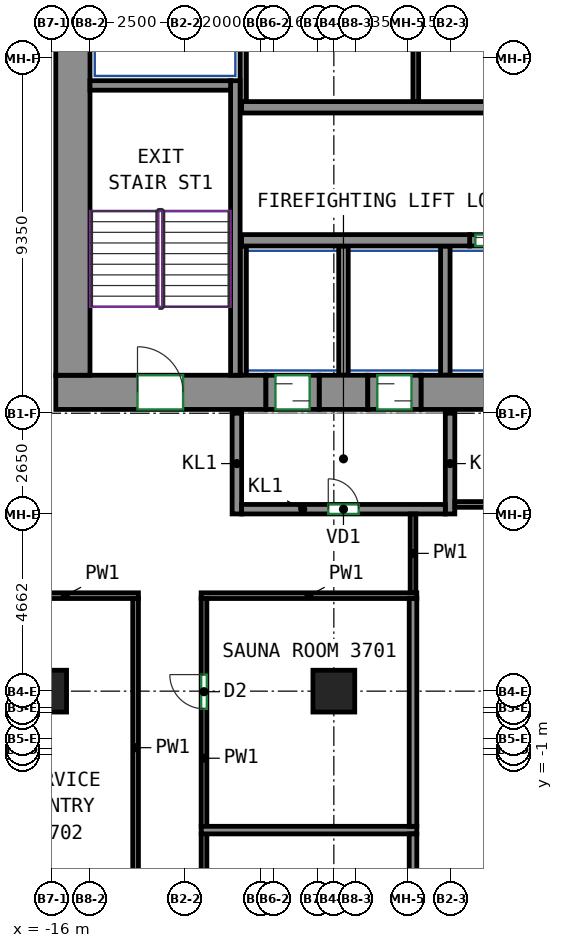
"""IFC4 building model, lengths in metres.
Left out: names, types, materials, properties, quantities, classifications, styles, units other than length and angle.
Written with IfcOpenShell. Run it as: python <this file> out.ifc"""

import sys

from ifc_helpers import new_model, si_unit, direction, frame, frame_2d, origin, origin_2d, place, context, subcontext, project, spatial, rectangle, extrude, source, transform, mapped, element, fill, save


model = new_model("IFC4")
c1 = context("Model", 3, precision=1e-05, world=origin(), true_north=direction((0.0, 1.0)))
c2 = subcontext(c1, "Body", "Model", "MODEL_VIEW")
j1 = project(units=[si_unit("LENGTHUNIT", "METRE"), si_unit("PLANEANGLEUNIT", "RADIAN")], contexts=[c1])
p1 = place(None, origin())
s1 = spatial("IfcSite", under=j1, at=p1, CompositionType="ELEMENT")
p2 = place(p1, origin())
s2 = spatial("IfcBuilding", under=s1, at=p2, CompositionType="ELEMENT")
p3 = place(p2, frame((0.0, 0.0, 160.9)))
s3 = spatial("IfcBuildingStorey", under=s2, at=p3, CompositionType="ELEMENT", Elevation=160.9)
m1 = source(origin(), c2, "Body", "SweptSolid", [
    extrude(rectangle(XDim=1.1, YDim=1.1, at=origin_2d()), origin(), (0.0, 0.0, 1.0), 3.0),
])
for number, where, z_axis, x_axis in (
    (1, (-16.167, 0.688, 0.0), (0.0, 0.0, 1.0), (1.0, 0.0, 0.0)),
    (2, (-8.583, 0.688, 0.0), (0.0, 0.0, 1.0), (1.0, 0.0, 0.0)),
):
    element("IfcColumn", number, at=place(p3, frame(where, z_axis=z_axis, x_axis=x_axis)), inside=s3, PredefinedType="COLUMN", context=c2, shape_type="MappedRepresentation", body=[
        mapped(m1, transform((0.0, 0.0, 0.0))),
    ])
m2 = source(origin(), c2, "Body", "SweptSolid", [
    extrude(rectangle(XDim=5.53, YDim=0.9, at=frame_2d((2.765, 0.0))), origin(), (0.0, 0.0, 1.0), 3.0),
])
p4 = place(p3, frame((-15.9, 8.55, 0.0), z_axis=(0.0, 0.0, 1.0), x_axis=(1.0, 0.0, 0.0)))
e3 = element("IfcWall", 3, at=p4, inside=s3, PredefinedType="SHEAR", context=c2, shape_type="MappedRepresentation", body=[
    mapped(m2, transform((0.0, 0.0, 0.0))),
])
p5 = place(p4, frame((2.15, 0.0, 0.0)))
e4 = element("IfcOpeningElement", 4, at=p5, cuts=e3, PredefinedType="OPENING", context=c2, shape_type="SweptSolid", body=[
    extrude(rectangle(XDim=1.2, YDim=2.1, at=frame_2d((0.6, 1.05))), frame((0.0, 0.46, 0.0), z_axis=(0.0, -1.0, 0.0), x_axis=(1.0, 0.0, 0.0)), (0.0, 0.0, 1.0), 0.92),
])
m3 = source(origin(), c2, "Body", "SweptSolid", [
    extrude(rectangle(XDim=1.28, YDim=0.9, at=frame_2d((0.64, 0.0))), origin(), (0.0, 0.0, 1.0), 3.0),
])
p6 = place(p3, frame((-8.97, 8.55, 0.0), z_axis=(0.0, 0.0, 1.0), x_axis=(1.0, 0.0, 0.0)))
e5 = element("IfcWall", 5, at=p6, inside=s3, PredefinedType="SHEAR", context=c2, shape_type="MappedRepresentation", body=[
    mapped(m3, transform((0.0, 0.0, 0.0))),
])
m4 = source(origin(), c2, "Body", "SweptSolid", [
    extrude(rectangle(XDim=14.18, YDim=0.9, at=frame_2d((7.09, 0.0))), origin(), (0.0, 0.0, 1.0), 3.0),
])
p7 = place(p3, frame((-6.29, 8.55, 0.0), z_axis=(0.0, 0.0, 1.0), x_axis=(1.0, 0.0, 0.0)))
e6 = element("IfcWall", 6, at=p7, inside=s3, PredefinedType="SHEAR", context=c2, shape_type="MappedRepresentation", body=[
    mapped(m4, transform((0.0, 0.0, 0.0))),
])
m5 = source(origin(), c2, "Body", "SweptSolid", [
    extrude(rectangle(XDim=12.0, YDim=0.9, at=frame_2d((6.0, 0.0))), origin(), (0.0, 0.0, 1.0), 3.0),
])
p8 = place(p3, frame((-15.45, 9.0, 0.0), z_axis=(0.0, 0.0, 1.0), x_axis=(0.0, 1.0, 0.0)))
e7 = element("IfcWall", 7, at=p8, inside=s3, PredefinedType="SHEAR", context=c2, shape_type="MappedRepresentation", body=[
    mapped(m5, transform((0.0, 0.0, 0.0))),
])
m6 = source(origin(), c2, "Body", "SweptSolid", [
    extrude(rectangle(XDim=7.75, YDim=0.25, at=frame_2d((3.875, 0.0))), origin(), (0.0, 0.0, 1.0), 3.0),
])
p9 = place(p3, frame((-11.175, 9.0, 0.0), z_axis=(0.0, 0.0, 1.0), x_axis=(0.0, 1.0, 0.0)))
e8 = element("IfcWall", 8, at=p9, inside=s3, PredefinedType="SHEAR", context=c2, shape_type="MappedRepresentation", body=[
    mapped(m6, transform((0.0, 0.0, 0.0))),
])
m7 = source(origin(), c2, "Body", "SweptSolid", [
    extrude(rectangle(XDim=3.7, YDim=0.25, at=frame_2d((1.85, 0.0))), origin(), (0.0, 0.0, 1.0), 3.0),
])
p10 = place(p3, frame((-15.0, 16.625, 0.0), z_axis=(0.0, 0.0, 1.0), x_axis=(1.0, 0.0, 0.0)))
e9 = element("IfcWall", 9, at=p10, inside=s3, PredefinedType="SHEAR", context=c2, shape_type="MappedRepresentation", body=[
    mapped(m7, transform((0.0, 0.0, 0.0))),
])
m8 = source(origin(), c2, "Body", "SweptSolid", [
    extrude(rectangle(XDim=6.0, YDim=0.3, at=frame_2d((3.0, 0.0))), origin(), (0.0, 0.0, 1.0), 3.0),
])
p11 = place(p3, frame((-11.01, 12.55, 0.0), z_axis=(0.0, 0.0, 1.0), x_axis=(1.0, 0.0, 0.0)))
e10 = element("IfcWall", 10, at=p11, inside=s3, PredefinedType="SHEAR", context=c2, shape_type="MappedRepresentation", body=[
    mapped(m8, transform((0.0, 0.0, 0.0))),
])
m9 = source(origin(), c2, "Body", "SweptSolid", [
    extrude(rectangle(XDim=14.04, YDim=0.3, at=frame_2d((7.02, 0.0))), origin(), (0.0, 0.0, 1.0), 3.0),
])
p12 = place(p3, frame((-11.01, 16.05, 0.0), z_axis=(0.0, 0.0, 1.0), x_axis=(1.0, 0.0, 0.0)))
e11 = element("IfcWall", 11, at=p12, inside=s3, PredefinedType="SHEAR", context=c2, shape_type="MappedRepresentation", body=[
    mapped(m9, transform((0.0, 0.0, 0.0))),
])
m10 = source(origin(), c2, "Body", "SweptSolid", [
    extrude(rectangle(XDim=1.4, YDim=0.3, at=frame_2d((0.7, 0.0))), origin(), (0.0, 0.0, 1.0), 3.0),
])
p13 = place(p3, frame((-5.01, 12.55, 0.0), z_axis=(0.0, 0.0, 1.0), x_axis=(1.0, 0.0, 0.0)))
e12 = element("IfcWall", 12, at=p13, inside=s3, PredefinedType="PARTITIONING", context=c2, shape_type="MappedRepresentation", body=[
    mapped(m10, transform((0.0, 0.0, 0.0))),
])
p14 = place(p13, frame((0.15, 0.0, 0.0)))
e13 = element("IfcOpeningElement", 13, at=p14, cuts=e12, PredefinedType="OPENING", context=c2, shape_type="SweptSolid", body=[
    extrude(rectangle(XDim=1.1, YDim=2.1, at=frame_2d((0.55, 1.05))), frame((0.0, 0.16, 0.0), z_axis=(0.0, -1.0, 0.0), x_axis=(1.0, 0.0, 0.0)), (0.0, 0.0, 1.0), 0.32),
])
m11 = source(origin(), c2, "Body", "SweptSolid", [
    extrude(rectangle(XDim=2.65, YDim=0.25, at=frame_2d((1.325, 0.0))), origin(), (0.0, 0.0, 1.0), 3.0),
])
for number, where, z_axis, x_axis in (
    (14, (-11.135, 5.35, 0.0), (0.0, 0.0, 1.0), (0.0, 1.0, 0.0)),
    (15, (-5.525, 5.35, 0.0), (0.0, 0.0, 1.0), (0.0, 1.0, 0.0)),
):
    element("IfcWall", number, at=place(p3, frame(where, z_axis=z_axis, x_axis=x_axis)), inside=s3, PredefinedType="PARTITIONING", context=c2, shape_type="MappedRepresentation", body=[
        mapped(m11, transform((0.0, 0.0, 0.0))),
    ])
m12 = source(origin(), c2, "Body", "SweptSolid", [
    extrude(rectangle(XDim=5.36, YDim=0.25, at=frame_2d((2.68, 0.0))), origin(), (0.0, 0.0, 1.0), 3.0),
])
p15 = place(p3, frame((-11.01, 5.475, 0.0), z_axis=(0.0, 0.0, 1.0), x_axis=(1.0, 0.0, 0.0)))
e16 = element("IfcWall", 16, at=p15, inside=s3, PredefinedType="PARTITIONING", context=c2, shape_type="MappedRepresentation", body=[
    mapped(m12, transform((0.0, 0.0, 0.0))),
])
p16 = place(p15, frame((2.28, 0.0, 0.0)))
e17 = element("IfcOpeningElement", 17, at=p16, cuts=e16, PredefinedType="OPENING", context=c2, shape_type="SweptSolid", body=[
    extrude(rectangle(XDim=0.8, YDim=2.0, at=frame_2d((0.4, 1.0))), frame((0.0, 0.135, 0.0), z_axis=(0.0, -1.0, 0.0), x_axis=(1.0, 0.0, 0.0)), (0.0, 0.0, 1.0), 0.27),
])
m13 = source(origin(), c2, "Body", "SweptSolid", [
    extrude(rectangle(XDim=4.8, YDim=0.165, at=frame_2d((2.4, 0.0))), origin(), (0.0, 0.0, 1.0), 3.0),
])
p17 = place(p3, frame((-10.968, 16.2, 0.0), z_axis=(0.0, 0.0, 1.0), x_axis=(0.0, 1.0, 0.0)))
e18 = element("IfcWall", 18, at=p17, inside=s3, PredefinedType="PARTITIONING", context=c2, shape_type="MappedRepresentation", body=[
    mapped(m13, transform((0.0, 0.0, 0.0))),
])
m14 = source(origin(), c2, "Body", "SweptSolid", [
    extrude(rectangle(XDim=3.4, YDim=0.165, at=frame_2d((1.7, 0.0))), origin(), (0.0, 0.0, 1.0), 3.0),
])
p18 = place(p3, frame((-10.968, 9.0, 0.0), z_axis=(0.0, 0.0, 1.0), x_axis=(0.0, 1.0, 0.0)))
e19 = element("IfcWall", 19, at=p18, inside=s3, PredefinedType="PARTITIONING", context=c2, shape_type="MappedRepresentation", body=[
    mapped(m14, transform((0.0, 0.0, 0.0))),
])
m15 = source(origin(), c2, "Body", "SweptSolid", [
    extrude(rectangle(XDim=3.4, YDim=0.25, at=frame_2d((1.7, 0.0))), origin(), (0.0, 0.0, 1.0), 3.0),
])
for number, where, z_axis, x_axis in (
    (20, (-5.65, 9.0, 0.0), (0.0, 0.0, 1.0), (0.0, 1.0, 0.0)),
    (21, (-8.33, 9.0, 0.0), (0.0, 0.0, 1.0), (0.0, 1.0, 0.0)),
):
    element("IfcWall", number, at=place(p3, frame(where, z_axis=z_axis, x_axis=x_axis)), inside=s3, PredefinedType="PARTITIONING", context=c2, shape_type="MappedRepresentation", body=[
        mapped(m15, transform((0.0, 0.0, 0.0))),
    ])
m16 = source(origin(), c2, "Body", "SweptSolid", [
    extrude(rectangle(XDim=4.8, YDim=0.15, at=frame_2d((2.4, 0.0))), origin(), (0.0, 0.0, 1.0), 3.0),
])
p19 = place(p3, frame((-6.427, 16.2, 0.0), z_axis=(0.0, 0.0, 1.0), x_axis=(0.0, 1.0, 0.0)))
e22 = element("IfcWall", 22, at=p19, inside=s3, PredefinedType="PARTITIONING", context=c2, shape_type="MappedRepresentation", body=[
    mapped(m16, transform((0.0, 0.0, 0.0))),
])
m17 = source(origin(), c2, "Body", "SweptSolid", [
    extrude(rectangle(XDim=1.4, YDim=0.9, at=frame_2d((0.7, 0.0))), origin(), (0.0, 0.0, 1.0), 2.7),
])
p20 = place(p3, frame((-10.37, 8.55, 0.0), z_axis=(0.0, 0.0, 1.0), x_axis=(1.0, 0.0, 0.0)))
e23 = element("IfcWall", 23, at=p20, inside=s3, PredefinedType="PARTITIONING", context=c2, shape_type="MappedRepresentation", body=[
    mapped(m17, transform((0.0, 0.0, 0.0))),
])
p21 = place(p20, frame((0.25, 0.0, 0.0)))
e24 = element("IfcOpeningElement", 24, at=p21, cuts=e23, PredefinedType="OPENING", context=c2, shape_type="SweptSolid", body=[
    extrude(rectangle(XDim=0.9, YDim=2.1, at=frame_2d((0.45, 1.05))), frame((0.0, 0.46, 0.0), z_axis=(0.0, -1.0, 0.0), x_axis=(1.0, 0.0, 0.0)), (0.0, 0.0, 1.0), 0.92),
])
m18 = source(origin(), c2, "Body", "SweptSolid", [
    extrude(rectangle(XDim=1.4, YDim=0.9, at=frame_2d((0.7, 0.0))), origin(), (0.0, 0.0, 1.0), 2.7),
])
p22 = place(p3, frame((-7.69, 8.55, 0.0), z_axis=(0.0, 0.0, 1.0), x_axis=(1.0, 0.0, 0.0)))
e25 = element("IfcWall", 25, at=p22, inside=s3, PredefinedType="PARTITIONING", context=c2, shape_type="MappedRepresentation", body=[
    mapped(m18, transform((0.0, 0.0, 0.0))),
])
p23 = place(p22, frame((0.25, 0.0, 0.0)))
e26 = element("IfcOpeningElement", 26, at=p23, cuts=e25, PredefinedType="OPENING", context=c2, shape_type="SweptSolid", body=[
    extrude(rectangle(XDim=0.9, YDim=2.1, at=frame_2d((0.45, 1.05))), frame((0.0, 0.46, 0.0), z_axis=(0.0, -1.0, 0.0), x_axis=(1.0, 0.0, 0.0)), (0.0, 0.0, 1.0), 0.92),
])
p24 = place(p3, frame((-12.0, -11.425, 0.0), z_axis=(0.0, 0.0, 1.0), x_axis=(0.0, 1.0, 0.0)))
e27 = element("IfcWall", 27, at=p24, inside=s3, PredefinedType="PARTITIONING", context=c2, shape_type="SweptSolid", body=[
    extrude(rectangle(XDim=8.366, YDim=0.15, at=frame_2d((4.183, 0.0))), origin(), (0.0, 0.0, 1.0), 3.0),
])
p25 = place(p24, frame((4.339, 0.0, 0.0)))
e28 = element("IfcOpeningElement", 28, at=p25, cuts=e27, PredefinedType="OPENING", context=c2, shape_type="SweptSolid", body=[
    extrude(rectangle(XDim=0.9, YDim=2.1, at=frame_2d((0.45, 1.05))), frame((0.0, 0.085, 0.0), z_axis=(0.0, -1.0, 0.0), x_axis=(1.0, 0.0, 0.0)), (0.0, 0.0, 1.0), 0.17),
])
p26 = place(p3, frame((-12.075, 3.2, 0.0), z_axis=(0.0, 0.0, 1.0), x_axis=(1.0, 0.0, 0.0)))
e29 = element("IfcWall", 29, at=p26, inside=s3, PredefinedType="PARTITIONING", context=c2, shape_type="SweptSolid", body=[
    extrude(rectangle(XDim=5.675, YDim=0.15, at=frame_2d((2.837, 0.0))), origin(), (0.0, 0.0, 1.0), 3.0),
])
p27 = place(p3, frame((-12.0, -2.879, 0.0), z_axis=(0.0, 0.0, 1.0), x_axis=(0.0, 1.0, 0.0)))
e30 = element("IfcWall", 30, at=p27, inside=s3, PredefinedType="PARTITIONING", context=c2, shape_type="SweptSolid", body=[
    extrude(rectangle(XDim=6.004, YDim=0.15, at=frame_2d((3.002, 0.0))), origin(), (0.0, 0.0, 1.0), 3.0),
])
p28 = place(p27, frame((3.102, 0.0, 0.0)))
e31 = element("IfcOpeningElement", 31, at=p28, cuts=e30, PredefinedType="OPENING", context=c2, shape_type="SweptSolid", body=[
    extrude(rectangle(XDim=0.9, YDim=2.1, at=frame_2d((0.45, 1.05))), frame((0.0, 0.085, 0.0), z_axis=(0.0, -1.0, 0.0), x_axis=(1.0, 0.0, 0.0)), (0.0, 0.0, 1.0), 0.17),
])
p29 = place(p3, frame((-17.575, 3.2, 0.0), z_axis=(0.0, 0.0, 1.0), x_axis=(1.0, 0.0, 0.0)))
e32 = element("IfcWall", 32, at=p29, inside=s3, PredefinedType="PARTITIONING", context=c2, shape_type="SweptSolid", body=[
    extrude(rectangle(XDim=3.85, YDim=0.15, at=frame_2d((1.925, 0.0))), origin(), (0.0, 0.0, 1.0), 3.0),
])
p30 = place(p3, frame((-13.8, 3.125, 0.0), z_axis=(0.0, 0.0, 1.0), x_axis=(0.0, -1.0, 0.0)))
e33 = element("IfcWall", 33, at=p30, inside=s3, PredefinedType="PARTITIONING", context=c2, shape_type="SweptSolid", body=[
    extrude(rectangle(XDim=7.85, YDim=0.15, at=frame_2d((3.925, 0.0))), origin(), (0.0, 0.0, 1.0), 3.0),
])
p31 = place(p3, frame((-6.5, 3.275, 0.0), z_axis=(0.0, 0.0, 1.0), x_axis=(0.0, 1.0, 0.0)))
e34 = element("IfcWall", 34, at=p31, inside=s3, PredefinedType="PARTITIONING", context=c2, shape_type="SweptSolid", body=[
    extrude(rectangle(XDim=2.075, YDim=0.15, at=frame_2d((1.038, 0.0))), origin(), (0.0, 0.0, 1.0), 3.0),
])
p32 = place(p3, frame((-5.4, 5.6, 0.0), z_axis=(0.0, 0.0, 1.0), x_axis=(1.0, 0.0, 0.0)))
e35 = element("IfcWall", 35, at=p32, inside=s3, PredefinedType="PARTITIONING", context=c2, shape_type="SweptSolid", body=[
    extrude(rectangle(XDim=13.975, YDim=0.15, at=frame_2d((6.987, 0.0))), origin(), (0.0, 0.0, 1.0), 3.0),
])
p33 = place(p32, frame((1.91, 0.0, 0.0)))
e36 = element("IfcOpeningElement", 36, at=p33, cuts=e35, PredefinedType="OPENING", context=c2, shape_type="SweptSolid", body=[
    extrude(rectangle(XDim=1.0, YDim=2.1, at=frame_2d((0.5, 1.05))), frame((0.0, 0.085, 0.0), z_axis=(0.0, -1.0, 0.0), x_axis=(1.0, 0.0, 0.0)), (0.0, 0.0, 1.0), 0.17),
])
p34 = place(p3, frame((-12.073, -2.969, 0.0), z_axis=(0.0, 0.0, 1.0), x_axis=(1.0, 0.0, 0.0)))
e37 = element("IfcWall", 37, at=p34, inside=s3, PredefinedType="PARTITIONING", context=c2, shape_type="SweptSolid", body=[
    extrude(rectangle(XDim=5.673, YDim=0.2, at=frame_2d((2.836, 0.0))), origin(), (0.0, 0.0, 1.0), 3.0),
])
p35 = place(p3, frame((-6.5, -9.3, 0.0), z_axis=(0.0, 0.0, 1.0), x_axis=(0.0, 1.0, 0.0)))
e38 = element("IfcWall", 38, at=p35, inside=s3, PredefinedType="PARTITIONING", context=c2, shape_type="SweptSolid", body=[
    extrude(rectangle(XDim=6.231, YDim=0.2, at=frame_2d((3.115, 0.0))), origin(), (0.0, 0.0, 1.0), 3.0),
])
p36 = place(p3, frame((-6.5, -2.869, 0.0), z_axis=(0.0, 0.0, 1.0), x_axis=(0.0, 1.0, 0.0)))
e39 = element("IfcWall", 39, at=p36, inside=s3, PredefinedType="PARTITIONING", context=c2, shape_type="SweptSolid", body=[
    extrude(rectangle(XDim=5.992, YDim=0.2, at=frame_2d((2.996, 0.0))), origin(), (0.0, 0.0, 1.0), 3.0),
])
p37 = place(p16, origin())
e40 = element("IfcDoor", 40, at=p37, inside=s3, OperationType="SINGLE_SWING_LEFT", PredefinedType="DOOR", context=c2, shape_type="SweptSolid", body=[
    extrude(rectangle(XDim=0.8, YDim=2.0, at=frame_2d((0.4, 1.0))), frame((0.0, 0.025, 0.0), z_axis=(0.0, -1.0, 0.0), x_axis=(1.0, 0.0, 0.0)), (0.0, 0.0, 1.0), 0.05),
])
fill(e17, e40)
p38 = place(p21, origin())
e41 = element("IfcDoor", 41, at=p38, inside=s3, OperationType="SLIDING_TO_LEFT", PredefinedType="DOOR", context=c2, shape_type="SweptSolid", body=[
    extrude(rectangle(XDim=0.9, YDim=2.1, at=frame_2d((0.45, 1.05))), frame((0.0, 0.355, 0.0), z_axis=(0.0, -1.0, 0.0), x_axis=(1.0, 0.0, 0.0)), (0.0, 0.0, 1.0), 0.05),
])
fill(e24, e41)
p39 = place(p23, origin())
e42 = element("IfcDoor", 42, at=p39, inside=s3, OperationType="SLIDING_TO_RIGHT", PredefinedType="DOOR", context=c2, shape_type="SweptSolid", body=[
    extrude(rectangle(XDim=0.9, YDim=2.1, at=frame_2d((0.45, 1.05))), frame((0.0, 0.355, 0.0), z_axis=(0.0, -1.0, 0.0), x_axis=(1.0, 0.0, 0.0)), (0.0, 0.0, 1.0), 0.05),
])
fill(e26, e42)
p40 = place(p14, origin())
e43 = element("IfcDoor", 43, at=p40, inside=s3, OperationType="DOUBLE_DOOR_SLIDING", PredefinedType="DOOR", context=c2, shape_type="SweptSolid", body=[
    extrude(rectangle(XDim=1.1, YDim=2.1, at=frame_2d((0.55, 1.05))), frame((0.0, 0.025, 0.0), z_axis=(0.0, -1.0, 0.0), x_axis=(1.0, 0.0, 0.0)), (0.0, 0.0, 1.0), 0.05),
])
fill(e13, e43)
p41 = place(p5, origin())
e44 = element("IfcDoor", 44, at=p41, inside=s3, OperationType="DOUBLE_DOOR_SINGLE_SWING", PredefinedType="DOOR", context=c2, shape_type="SweptSolid", body=[
    extrude(rectangle(XDim=1.2, YDim=2.1, at=frame_2d((0.6, 1.05))), frame((0.0, 0.355, 0.0), z_axis=(0.0, -1.0, 0.0), x_axis=(1.0, 0.0, 0.0)), (0.0, 0.0, 1.0), 0.05),
])
fill(e4, e44)
p42 = place(p28, origin())
e45 = element("IfcDoor", 45, at=p42, inside=s3, OperationType="SINGLE_SWING_RIGHT", PredefinedType="DOOR", context=c2, shape_type="SweptSolid", body=[
    extrude(rectangle(XDim=0.9, YDim=2.1, at=frame_2d((0.45, 1.05))), frame((0.0, 0.025, 0.0), z_axis=(0.0, -1.0, 0.0), x_axis=(1.0, 0.0, 0.0)), (0.0, 0.0, 1.0), 0.05),
])
fill(e31, e45)
save(model, sys.argv[1])
